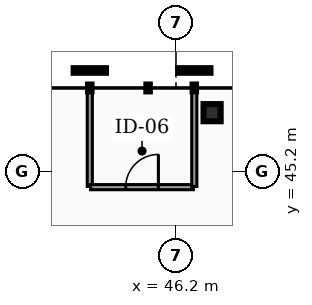
"""IFC4 building model, lengths in metres.
Left out: names, types, materials, properties, quantities, classifications, styles, units other than length and angle.
Written with IfcOpenShell. Run it as: python <this file> out.ifc"""

import sys

from ifc_helpers import new_model, si_unit, direction, frame, frame_2d, origin, origin_2d, place, context, subcontext, project, spatial, rectangle, hollow_rectangle, extrude, element, fill, save


model = new_model("IFC4")
c1 = context("Model", 3, precision=1e-05, world=origin(), true_north=direction((0.0, 1.0)))
c2 = subcontext(c1, "Body", "Model", "MODEL_VIEW")
j1 = project(units=[si_unit("LENGTHUNIT", "METRE"), si_unit("PLANEANGLEUNIT", "RADIAN")], contexts=[c1])
p1 = place(None, origin())
s1 = spatial("IfcSite", under=j1, at=p1, CompositionType="ELEMENT")
p2 = place(p1, origin())
s2 = spatial("IfcBuilding", under=s1, at=p2, CompositionType="ELEMENT")
p3 = place(p2, frame((0.0, 0.0, 299.2)))
s3 = spatial("IfcBuildingStorey", under=s2, at=p3, CompositionType="ELEMENT", Elevation=299.2)
p4 = place(p3, frame((47.151, 46.75, 0.0), z_axis=(0.0, 0.0, 1.0), x_axis=(1.0, 0.0, 0.0)))
e1 = element("IfcColumn", 1, at=p4, inside=s3, PredefinedType="COLUMN", context=c2, shape_type="SweptSolid", body=[
    extrude(hollow_rectangle(XDim=0.45, YDim=0.45, WallThickness=0.022, at=origin_2d()), origin(), (0.0, 0.0, 1.0), 3.78),
])
p5 = place(p3, frame((43.932, 44.81, 0.0), z_axis=(0.0, 0.0, 1.0), x_axis=(0.0, 1.0, 0.0)))
e2 = element("IfcWall", 2, at=p5, inside=s3, PredefinedType="PARTITIONING", context=c2, shape_type="SweptSolid", body=[
    extrude(rectangle(XDim=2.575, YDim=0.135, at=frame_2d((1.288, 0.0))), origin(), (0.0, 0.0, 1.0), 2.835),
])
p6 = place(p3, frame((43.952, 44.79, 0.0), z_axis=(0.0, 0.0, 1.0), x_axis=(1.0, 0.0, 0.0)))
e3 = element("IfcWall", 3, at=p6, inside=s3, PredefinedType="PARTITIONING", context=c2, shape_type="SweptSolid", body=[
    extrude(rectangle(XDim=2.71, YDim=0.135, at=frame_2d((1.355, 0.0))), origin(), (0.0, 0.0, 1.0), 2.835),
])
p7 = place(p6, frame((0.925, 0.0, 0.0)))
e4 = element("IfcOpeningElement", 4, at=p7, cuts=e3, PredefinedType="OPENING", context=c2, shape_type="SweptSolid", body=[
    extrude(rectangle(XDim=0.86, YDim=2.05, at=frame_2d((0.43, 1.025))), frame((0.0, 0.077, 0.0), z_axis=(0.0, -1.0, 0.0), x_axis=(1.0, 0.0, 0.0)), (0.0, 0.0, 1.0), 0.155),
])
p8 = place(p3, frame((46.682, 44.81, 0.0), z_axis=(0.0, 0.0, 1.0), x_axis=(0.0, 1.0, 0.0)))
e5 = element("IfcWall", 5, at=p8, inside=s3, PredefinedType="PARTITIONING", context=c2, shape_type="SweptSolid", body=[
    extrude(rectangle(XDim=2.575, YDim=0.135, at=frame_2d((1.288, 0.0))), origin(), (0.0, 0.0, 1.0), 2.835),
])
p9 = place(p7, origin())
e6 = element("IfcDoor", 6, at=p9, inside=s3, OperationType="SINGLE_SWING_RIGHT", PredefinedType="DOOR", context=c2, shape_type="SweptSolid", body=[
    extrude(rectangle(XDim=0.86, YDim=2.05, at=frame_2d((0.43, 1.025))), frame((0.0, 0.025, 0.0), z_axis=(0.0, -1.0, 0.0), x_axis=(1.0, 0.0, 0.0)), (0.0, 0.0, 1.0), 0.05),
])
fill(e4, e6)
save(model, sys.argv[1])
